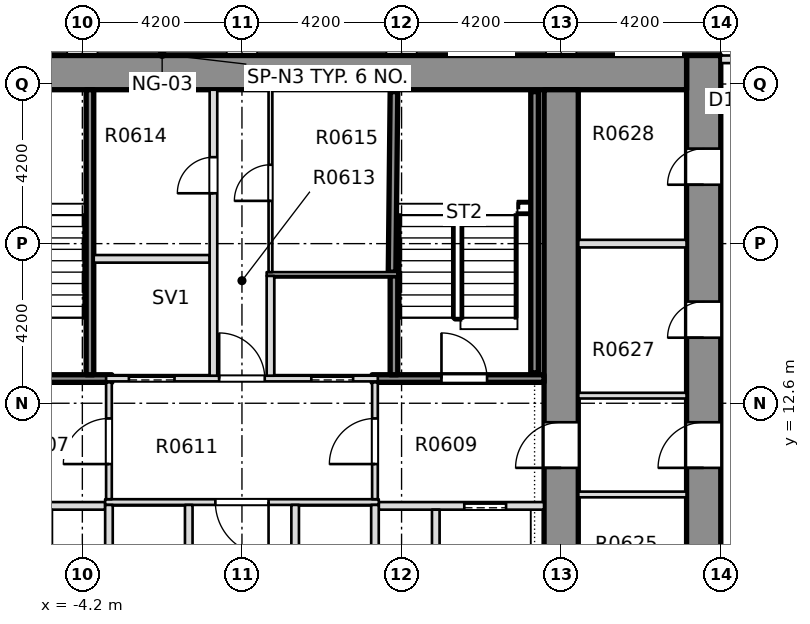
"""IFC4 building model, lengths in metres.
Left out: names, types, materials, properties, quantities, classifications, styles, units other than length and angle.
Written with IfcOpenShell. Run it as: python <this file> out.ifc"""

import sys

from ifc_helpers import new_model, si_unit, direction, frame, frame_2d, origin, place, context, subcontext, project, spatial, rectangle, extrude, element, fill, save


model = new_model("IFC4")
c1 = context("Model", 3, precision=1e-05, world=origin(), true_north=direction((0.0, 1.0)))
c2 = subcontext(c1, "Body", "Model", "MODEL_VIEW")
j1 = project(units=[si_unit("LENGTHUNIT", "METRE"), si_unit("PLANEANGLEUNIT", "RADIAN")], contexts=[c1])
p1 = place(None, origin())
s1 = spatial("IfcSite", under=j1, at=p1, CompositionType="ELEMENT")
p2 = place(p1, origin())
s2 = spatial("IfcBuilding", under=s1, at=p2, CompositionType="ELEMENT")
p3 = place(p2, frame((0.0, 0.0, 34.5)))
s3 = spatial("IfcBuildingStorey", under=s2, at=p3, CompositionType="ELEMENT", Elevation=34.5)
p4 = place(p3, frame((12.15, -8.4, -0.32), z_axis=(0.0, 0.0, 1.0), x_axis=(0.0, 1.0, 0.0)))
e1 = element("IfcWall", 1, at=p4, inside=s3, PredefinedType="SHEAR", context=c2, shape_type="SweptSolid", body=[
    extrude(rectangle(XDim=30.15, YDim=0.9, at=frame_2d((15.075, 0.0))), origin(), (0.0, 0.0, 1.0), 3.45),
])
p5 = place(p4, frame((3.425, 0.0, 0.32)))
e2 = element("IfcOpeningElement", 2, at=p5, cuts=e1, PredefinedType="OPENING", context=c2, shape_type="SweptSolid", body=[
    extrude(rectangle(XDim=0.95, YDim=2.1, at=frame_2d((0.475, 1.05))), frame((0.0, 0.46, 0.0), z_axis=(0.0, -1.0, 0.0), x_axis=(1.0, 0.0, 0.0)), (0.0, 0.0, 1.0), 0.92),
])
p6 = place(p4, frame((8.075, 0.0, 0.32)))
e3 = element("IfcOpeningElement", 3, at=p6, cuts=e1, PredefinedType="OPENING", context=c2, shape_type="SweptSolid", body=[
    extrude(rectangle(XDim=0.95, YDim=2.1, at=frame_2d((0.475, 1.05))), frame((0.0, 0.46, 0.0), z_axis=(0.0, -1.0, 0.0), x_axis=(1.0, 0.0, 0.0)), (0.0, 0.0, 1.0), 0.92),
])
p7 = place(p4, frame((11.425, 0.0, 0.32)))
e4 = element("IfcOpeningElement", 4, at=p7, cuts=e1, PredefinedType="OPENING", context=c2, shape_type="SweptSolid", body=[
    extrude(rectangle(XDim=0.95, YDim=2.1, at=frame_2d((0.475, 1.05))), frame((0.0, 0.46, 0.0), z_axis=(0.0, -1.0, 0.0), x_axis=(1.0, 0.0, 0.0)), (0.0, 0.0, 1.0), 0.92),
])
p8 = place(p4, frame((15.625, 0.0, 0.32)))
e5 = element("IfcOpeningElement", 5, at=p8, cuts=e1, PredefinedType="OPENING", context=c2, shape_type="SweptSolid", body=[
    extrude(rectangle(XDim=0.95, YDim=2.1, at=frame_2d((0.475, 1.05))), frame((0.0, 0.46, 0.0), z_axis=(0.0, -1.0, 0.0), x_axis=(1.0, 0.0, 0.0)), (0.0, 0.0, 1.0), 0.92),
])
p9 = place(p4, frame((22.725, 0.0, 0.32)))
e6 = element("IfcOpeningElement", 6, at=p9, cuts=e1, PredefinedType="OPENING", context=c2, shape_type="SweptSolid", body=[
    extrude(rectangle(XDim=0.95, YDim=2.1, at=frame_2d((0.475, 1.05))), frame((0.0, 0.46, 0.0), z_axis=(0.0, -1.0, 0.0), x_axis=(1.0, 0.0, 0.0)), (0.0, 0.0, 1.0), 0.92),
])
p10 = place(p4, frame((26.75, 0.0, 0.32)))
e7 = element("IfcOpeningElement", 7, at=p10, cuts=e1, PredefinedType="OPENING", context=c2, shape_type="SweptSolid", body=[
    extrude(rectangle(XDim=0.95, YDim=2.1, at=frame_2d((0.475, 1.05))), frame((0.0, 0.46, 0.0), z_axis=(0.0, -1.0, 0.0), x_axis=(1.0, 0.0, 0.0)), (0.0, 0.0, 1.0), 0.92),
])
p11 = place(p4, frame((19.3, 0.0, 0.32)))
e8 = element("IfcOpeningElement", 8, at=p11, cuts=e1, PredefinedType="OPENING", context=c2, shape_type="SweptSolid", body=[
    extrude(rectangle(XDim=1.2, YDim=2.1, at=frame_2d((0.6, 1.05))), frame((0.0, 0.46, 0.0), z_axis=(0.0, -1.0, 0.0), x_axis=(1.0, 0.0, 0.0)), (0.0, 0.0, 1.0), 0.92),
])
p12 = place(p3, frame((-11.7, 21.3, -0.32), z_axis=(0.0, 0.0, 1.0), x_axis=(1.0, 0.0, 0.0)))
e9 = element("IfcWall", 9, at=p12, inside=s3, PredefinedType="SOLIDWALL", context=c2, shape_type="SweptSolid", body=[
    extrude(rectangle(XDim=23.4, YDim=0.9, at=frame_2d((11.7, 0.0))), origin(), (0.0, 0.0, 1.0), 3.45),
])
p13 = place(p3, frame((8.4, -7.5, -0.32), z_axis=(0.0, 0.0, 1.0), x_axis=(0.0, 1.0, 0.0)))
e10 = element("IfcWall", 10, at=p13, inside=s3, PredefinedType="SHEAR", context=c2, shape_type="SweptSolid", body=[
    extrude(rectangle(XDim=28.35, YDim=0.9, at=frame_2d((14.175, 0.0))), origin(), (0.0, 0.0, 1.0), 3.45),
])
p14 = place(p13, frame((18.4, 0.0, 0.32)))
e11 = element("IfcOpeningElement", 11, at=p14, cuts=e10, PredefinedType="OPENING", context=c2, shape_type="SweptSolid", body=[
    extrude(rectangle(XDim=1.2, YDim=2.1, at=frame_2d((0.6, 1.05))), frame((0.0, 0.46, 0.0), z_axis=(0.0, -1.0, 0.0), x_axis=(1.0, 0.0, 0.0)), (0.0, 0.0, 1.0), 0.92),
])
p15 = place(p3, frame((16.1, 21.65, 0.0), z_axis=(0.0, 0.0, 1.0), x_axis=(-1.0, 0.0, 0.0)))
e12 = element("IfcWall", 12, at=p15, inside=s3, PredefinedType="STANDARD", context=c2, shape_type="SweptSolid", body=[
    extrude(rectangle(XDim=3.5, YDim=0.2, at=frame_2d((1.75, 0.0))), origin(), (0.0, 0.0, 1.0), 3.13),
])
p16 = place(p15, frame((2.2, 0.0, 0.0)))
e13 = element("IfcOpeningElement", 13, at=p16, cuts=e12, PredefinedType="OPENING", context=c2, shape_type="SweptSolid", body=[
    extrude(rectangle(XDim=1.0, YDim=2.4, at=frame_2d((0.5, 1.2))), frame((0.0, 0.11, 0.0), z_axis=(0.0, -1.0, 0.0), x_axis=(1.0, 0.0, 0.0)), (0.0, 0.0, 1.0), 0.22),
])
p17 = place(p3, frame((-7.949, 9.9, 0.0), z_axis=(0.0, 0.0, 1.0), x_axis=(1.0, 0.0, 0.0)))
e14 = element("IfcWall", 14, at=p17, inside=s3, PredefinedType="PARTITIONING", context=c2, shape_type="SweptSolid", body=[
    extrude(rectangle(XDim=4.349, YDim=0.2, at=frame_2d((2.174, 0.0))), origin(), (0.0, 0.0, 1.0), 3.13),
])
p18 = place(p17, frame((0.999, 0.0, 0.0)))
e15 = element("IfcOpeningElement", 15, at=p18, cuts=e14, PredefinedType="OPENING", context=c2, shape_type="SweptSolid", body=[
    extrude(rectangle(XDim=1.1, YDim=2.1, at=frame_2d((0.55, 1.05))), frame((0.0, 0.11, 0.0), z_axis=(0.0, -1.0, 0.0), x_axis=(1.0, 0.0, 0.0)), (0.0, 0.0, 1.0), 0.22),
])
p19 = place(p3, frame((3.6, 9.9, 0.0), z_axis=(0.0, 0.0, 1.0), x_axis=(1.0, 0.0, 0.0)))
e16 = element("IfcWall", 16, at=p19, inside=s3, PredefinedType="PARTITIONING", context=c2, shape_type="SweptSolid", body=[
    extrude(rectangle(XDim=4.349, YDim=0.2, at=frame_2d((2.174, 0.0))), origin(), (0.0, 0.0, 1.0), 3.13),
])
p20 = place(p19, frame((2.25, 0.0, 0.0)))
e17 = element("IfcOpeningElement", 17, at=p20, cuts=e16, PredefinedType="OPENING", context=c2, shape_type="SweptSolid", body=[
    extrude(rectangle(XDim=1.1, YDim=2.1, at=frame_2d((0.55, 1.05))), frame((0.0, 0.11, 0.0), z_axis=(0.0, -1.0, 0.0), x_axis=(1.0, 0.0, 0.0)), (0.0, 0.0, 1.0), 0.22),
])
p21 = place(p3, frame((-3.6, 10.0, 0.0), z_axis=(0.0, 0.0, 1.0), x_axis=(1.0, 0.0, 0.0)))
e18 = element("IfcWall", 18, at=p21, inside=s3, PredefinedType="PARTITIONING", context=c2, shape_type="SweptSolid", body=[
    extrude(rectangle(XDim=7.2, YDim=0.15, at=frame_2d((3.6, 0.0))), origin(), (0.0, 0.0, 1.0), 3.13),
])
p22 = place(p21, frame((2.9, 0.0, 0.0)))
e19 = element("IfcOpeningElement", 19, at=p22, cuts=e18, PredefinedType="OPENING", context=c2, shape_type="SweptSolid", body=[
    extrude(rectangle(XDim=1.4, YDim=2.1, at=frame_2d((0.7, 1.05))), frame((0.0, 0.085, 0.0), z_axis=(0.0, -1.0, 0.0), x_axis=(1.0, 0.0, 0.0)), (0.0, 0.0, 1.0), 0.17),
])
p23 = place(p3, frame((-7.949, 13.25, 0.0), z_axis=(0.0, 0.0, 1.0), x_axis=(1.0, 0.0, 0.0)))
e20 = element("IfcWall", 20, at=p23, inside=s3, PredefinedType="SOLIDWALL", context=c2, shape_type="SweptSolid", body=[
    extrude(rectangle(XDim=4.524, YDim=0.2, at=frame_2d((2.262, 0.0))), origin(), (0.0, 0.0, 1.0), 3.13),
])
p24 = place(p23, frame((1.499, 0.0, 0.0)))
e21 = element("IfcOpeningElement", 21, at=p24, cuts=e20, PredefinedType="OPENING", context=c2, shape_type="SweptSolid", body=[
    extrude(rectangle(XDim=1.2, YDim=2.1, at=frame_2d((0.6, 1.05))), frame((0.0, 0.11, 0.0), z_axis=(0.0, -1.0, 0.0), x_axis=(1.0, 0.0, 0.0)), (0.0, 0.0, 1.0), 0.22),
])
p25 = place(p3, frame((-3.575, 13.25, 0.0), z_axis=(0.0, 0.0, 1.0), x_axis=(1.0, 0.0, 0.0)))
e22 = element("IfcWall", 22, at=p25, inside=s3, PredefinedType="PARTITIONING", context=c2, shape_type="SweptSolid", body=[
    extrude(rectangle(XDim=7.15, YDim=0.15, at=frame_2d((3.575, 0.0))), origin(), (0.0, 0.0, 1.0), 3.13),
])
p26 = place(p25, frame((0.6, 0.0, 0.0)))
e23 = element("IfcOpeningElement", 23, at=p26, cuts=e22, PredefinedType="OPENING", context=c2, shape_type="SweptSolid", body=[
    extrude(rectangle(XDim=1.2, YDim=2.1, at=frame_2d((0.6, 1.05))), frame((0.0, 0.085, 0.0), z_axis=(0.0, -1.0, 0.0), x_axis=(1.0, 0.0, 0.0)), (0.0, 0.0, 1.0), 0.17),
])
p27 = place(p25, frame((5.4, 0.0, 0.0)))
e24 = element("IfcOpeningElement", 24, at=p27, cuts=e22, PredefinedType="OPENING", context=c2, shape_type="SweptSolid", body=[
    extrude(rectangle(XDim=1.1, YDim=2.1, at=frame_2d((0.55, 1.05))), frame((0.0, 0.085, 0.0), z_axis=(0.0, -1.0, 0.0), x_axis=(1.0, 0.0, 0.0)), (0.0, 0.0, 1.0), 0.17),
])
p28 = place(p25, frame((2.975, 0.0, 0.0)))
e25 = element("IfcOpeningElement", 25, at=p28, cuts=e22, PredefinedType="OPENING", context=c2, shape_type="SweptSolid", body=[
    extrude(rectangle(XDim=1.2, YDim=2.1, at=frame_2d((0.6, 1.05))), frame((0.0, 0.085, 0.0), z_axis=(0.0, -1.0, 0.0), x_axis=(1.0, 0.0, 0.0)), (0.0, 0.0, 1.0), 0.17),
])
p29 = place(p3, frame((3.425, 13.25, 0.0), z_axis=(0.0, 0.0, 1.0), x_axis=(1.0, 0.0, 0.0)))
e26 = element("IfcWall", 26, at=p29, inside=s3, PredefinedType="SOLIDWALL", context=c2, shape_type="SweptSolid", body=[
    extrude(rectangle(XDim=4.524, YDim=0.2, at=frame_2d((2.262, 0.0))), origin(), (0.0, 0.0, 1.0), 3.13),
])
p30 = place(p29, frame((1.825, 0.0, 0.0)))
e27 = element("IfcOpeningElement", 27, at=p30, cuts=e26, PredefinedType="OPENING", context=c2, shape_type="SweptSolid", body=[
    extrude(rectangle(XDim=1.2, YDim=2.1, at=frame_2d((0.6, 1.05))), frame((0.0, 0.11, 0.0), z_axis=(0.0, -1.0, 0.0), x_axis=(1.0, 0.0, 0.0)), (0.0, 0.0, 1.0), 0.22),
])
p31 = place(p3, frame((0.65, 16.0, 0.0), z_axis=(0.0, 0.0, 1.0), x_axis=(1.0, 0.0, 0.0)))
e28 = element("IfcWall", 28, at=p31, inside=s3, PredefinedType="PARTITIONING", context=c2, shape_type="SweptSolid", body=[
    extrude(rectangle(XDim=3.45, YDim=0.1, at=frame_2d((1.725, 0.0))), origin(), (0.0, 0.0, 1.0), 3.13),
])
p32 = place(p3, frame((-3.9, 16.4, 0.0), z_axis=(0.0, 0.0, 1.0), x_axis=(1.0, 0.0, 0.0)))
e29 = element("IfcWall", 29, at=p32, inside=s3, PredefinedType="PARTITIONING", context=c2, shape_type="SweptSolid", body=[
    extrude(rectangle(XDim=3.05, YDim=0.2, at=frame_2d((1.525, 0.0))), origin(), (0.0, 0.0, 1.0), 3.13),
])
p33 = place(p3, frame((-4.0, 13.35, 0.0), z_axis=(0.0, 0.0, 1.0), x_axis=(0.0, 1.0, 0.0)))
e30 = element("IfcWall", 30, at=p33, inside=s3, PredefinedType="SOLIDWALL", context=c2, shape_type="SweptSolid", body=[
    extrude(rectangle(XDim=7.499, YDim=0.2, at=frame_2d((3.75, 0.0))), origin(), (0.0, 0.0, 1.0), 3.13),
])
p34 = place(p3, frame((-3.5, 7.075, 0.0), z_axis=(0.0, 0.0, 1.0), x_axis=(0.0, 1.0, 0.0)))
e31 = element("IfcWall", 31, at=p34, inside=s3, PredefinedType="PARTITIONING", context=c2, shape_type="SweptSolid", body=[
    extrude(rectangle(XDim=2.85, YDim=0.2, at=frame_2d((1.425, 0.0))), origin(), (0.0, 0.0, 1.0), 3.13),
])
p35 = place(p3, frame((-3.5, 10.075, 0.0), z_axis=(0.0, 0.0, 1.0), x_axis=(0.0, 1.0, 0.0)))
e32 = element("IfcWall", 32, at=p35, inside=s3, PredefinedType="PARTITIONING", context=c2, shape_type="SweptSolid", body=[
    extrude(rectangle(XDim=3.075, YDim=0.15, at=frame_2d((1.538, 0.0))), origin(), (0.0, 0.0, 1.0), 3.13),
])
p36 = place(p35, frame((0.925, 0.0, 0.0)))
e33 = element("IfcOpeningElement", 33, at=p36, cuts=e32, PredefinedType="OPENING", context=c2, shape_type="SweptSolid", body=[
    extrude(rectangle(XDim=1.2, YDim=2.1, at=frame_2d((0.6, 1.05))), frame((0.0, 0.085, 0.0), z_axis=(0.0, -1.0, 0.0), x_axis=(1.0, 0.0, 0.0)), (0.0, 0.0, 1.0), 0.17),
])
p37 = place(p3, frame((-1.4, 7.075, 0.0), z_axis=(0.0, 0.0, 1.0), x_axis=(0.0, 1.0, 0.0)))
e34 = element("IfcWall", 34, at=p37, inside=s3, PredefinedType="PARTITIONING", context=c2, shape_type="SweptSolid", body=[
    extrude(rectangle(XDim=2.85, YDim=0.2, at=frame_2d((1.425, 0.0))), origin(), (0.0, 0.0, 1.0), 3.13),
])
p38 = place(p3, frame((-0.75, 13.325, 0.0), z_axis=(0.0, 0.0, 1.0), x_axis=(0.0, 1.0, 0.0)))
e35 = element("IfcWall", 35, at=p38, inside=s3, PredefinedType="PARTITIONING", context=c2, shape_type="SweptSolid", body=[
    extrude(rectangle(XDim=7.524, YDim=0.2, at=frame_2d((3.762, 0.0))), origin(), (0.0, 0.0, 1.0), 3.13),
])
p39 = place(p38, frame((4.8, 0.0, 0.0)))
e36 = element("IfcOpeningElement", 36, at=p39, cuts=e35, PredefinedType="OPENING", context=c2, shape_type="SweptSolid", body=[
    extrude(rectangle(XDim=0.95, YDim=2.1, at=frame_2d((0.475, 1.05))), frame((0.0, 0.11, 0.0), z_axis=(0.0, -1.0, 0.0), x_axis=(1.0, 0.0, 0.0)), (0.0, 0.0, 1.0), 0.22),
])
p40 = place(p3, frame((0.75, 13.325, 0.0), z_axis=(0.0, 0.0, 1.0), x_axis=(0.0, 1.0, 0.0)))
e37 = element("IfcWall", 37, at=p40, inside=s3, PredefinedType="PARTITIONING", context=c2, shape_type="SweptSolid", body=[
    extrude(rectangle(XDim=2.625, YDim=0.2, at=frame_2d((1.312, 0.0))), origin(), (0.0, 0.0, 1.0), 3.13),
])
p41 = place(p3, frame((0.75, 16.05, 0.0), z_axis=(0.0, 0.0, 1.0), x_axis=(0.0, 1.0, 0.0)))
e38 = element("IfcWall", 38, at=p41, inside=s3, PredefinedType="PARTITIONING", context=c2, shape_type="SweptSolid", body=[
    extrude(rectangle(XDim=4.799, YDim=0.1, at=frame_2d((2.399, 0.0))), origin(), (0.0, 0.0, 1.0), 3.13),
])
p42 = place(p41, frame((1.875, 0.0, 0.0)))
e39 = element("IfcOpeningElement", 39, at=p42, cuts=e38, PredefinedType="OPENING", context=c2, shape_type="SweptSolid", body=[
    extrude(rectangle(XDim=0.95, YDim=2.1, at=frame_2d((0.475, 1.05))), frame((0.0, 0.06, 0.0), z_axis=(0.0, -1.0, 0.0), x_axis=(1.0, 0.0, 0.0)), (0.0, 0.0, 1.0), 0.12),
])
for number, where, z_axis, x_axis in (
    (40, (1.4, 7.075, 0.0), (0.0, 0.0, 1.0), (0.0, 1.0, 0.0)),
    (41, (3.5, 7.075, 0.0), (0.0, 0.0, 1.0), (0.0, 1.0, 0.0)),
):
    element("IfcWall", number, at=place(p3, frame(where, z_axis=z_axis, x_axis=x_axis)), inside=s3, PredefinedType="PARTITIONING", context=c2, shape_type="SweptSolid", body=[
        extrude(rectangle(XDim=2.85, YDim=0.2, at=frame_2d((1.425, 0.0))), origin(), (0.0, 0.0, 1.0), 3.13),
    ])
p43 = place(p3, frame((3.5, 10.075, 0.0), z_axis=(0.0, 0.0, 1.0), x_axis=(0.0, 1.0, 0.0)))
e42 = element("IfcWall", 42, at=p43, inside=s3, PredefinedType="PARTITIONING", context=c2, shape_type="SweptSolid", body=[
    extrude(rectangle(XDim=3.075, YDim=0.15, at=frame_2d((1.538, 0.0))), origin(), (0.0, 0.0, 1.0), 3.13),
])
p44 = place(p43, frame((0.925, 0.0, 0.0)))
e43 = element("IfcOpeningElement", 43, at=p44, cuts=e42, PredefinedType="OPENING", context=c2, shape_type="SweptSolid", body=[
    extrude(rectangle(XDim=1.2, YDim=2.1, at=frame_2d((0.6, 1.05))), frame((0.0, 0.085, 0.0), z_axis=(0.0, -1.0, 0.0), x_axis=(1.0, 0.0, 0.0)), (0.0, 0.0, 1.0), 0.17),
])
p45 = place(p3, frame((4.0, 13.35, 0.0), z_axis=(0.0, 0.0, 1.0), x_axis=(0.0, 1.0, 0.0)))
e44 = element("IfcWall", 44, at=p45, inside=s3, PredefinedType="SOLIDWALL", context=c2, shape_type="SweptSolid", body=[
    extrude(rectangle(XDim=2.6, YDim=0.2, at=frame_2d((1.3, 0.0))), origin(), (0.0, 0.0, 1.0), 3.13),
])
p46 = place(p3, frame((3.95, 16.05, 0.0), z_axis=(0.0, 0.0, 1.0), x_axis=(0.010538176883, 0.999944471872, 0.0)))
e45 = element("IfcWall", 45, at=p46, inside=s3, PredefinedType="SOLIDWALL", context=c2, shape_type="SweptSolid", body=[
    extrude(rectangle(XDim=4.749, YDim=0.2, at=frame_2d((2.375, 0.0))), origin(), (0.0, 0.0, 1.0), 3.13),
])
p47 = place(p3, frame((5.1, 7.075, 0.0), z_axis=(0.0, 0.0, 1.0), x_axis=(0.0, 1.0, 0.0)))
e46 = element("IfcWall", 46, at=p47, inside=s3, PredefinedType="PARTITIONING", context=c2, shape_type="SweptSolid", body=[
    extrude(rectangle(XDim=2.725, YDim=0.2, at=frame_2d((1.363, 0.0))), origin(), (0.0, 0.0, 1.0), 3.13),
])
for number, where, z_axis, x_axis in (
    (47, (8.851, 10.2, 0.0), (0.0, 0.0, 1.0), (1.0, 0.0, 0.0)),
    (48, (8.851, 12.8, 0.0), (0.0, 0.0, 1.0), (1.0, 0.0, 0.0)),
):
    element("IfcWall", number, at=place(p3, frame(where, z_axis=z_axis, x_axis=x_axis)), inside=s3, PredefinedType="PARTITIONING", context=c2, shape_type="SweptSolid", body=[
        extrude(rectangle(XDim=2.848, YDim=0.15, at=frame_2d((1.424, 0.0))), origin(), (0.0, 0.0, 1.0), 3.13),
    ])
p48 = place(p3, frame((8.851, 16.8, 0.0), z_axis=(0.0, 0.0, 1.0), x_axis=(1.0, 0.0, 0.0)))
e49 = element("IfcWall", 49, at=p48, inside=s3, PredefinedType="PARTITIONING", context=c2, shape_type="SweptSolid", body=[
    extrude(rectangle(XDim=2.848, YDim=0.2, at=frame_2d((1.424, 0.0))), origin(), (0.0, 0.0, 1.0), 3.13),
])
p49 = place(p3, frame((7.7, 13.4, 0.0), z_axis=(0.0, 0.0, 1.0), x_axis=(0.0, 1.0, 0.0)))
e50 = element("IfcWall", 50, at=p49, inside=s3, PredefinedType="SOLIDWALL", context=c2, shape_type="SweptSolid", body=[
    extrude(rectangle(XDim=7.4, YDim=0.2, at=frame_2d((3.7, 0.0))), origin(), (0.0, 0.0, 1.0), 3.13),
])
p50 = place(p30, origin())
e51 = element("IfcDoor", 51, at=p50, inside=s3, OperationType="SINGLE_SWING_RIGHT", PredefinedType="DOOR", context=c2, shape_type="SweptSolid", body=[
    extrude(rectangle(XDim=1.2, YDim=2.1, at=frame_2d((0.6, 1.05))), frame((0.0, 0.025, 0.0), z_axis=(0.0, -1.0, 0.0), x_axis=(1.0, 0.0, 0.0)), (0.0, 0.0, 1.0), 0.05),
])
fill(e27, e51)
p51 = place(p20, origin())
e52 = element("IfcDoor", 52, at=p51, inside=s3, OperationType="SLIDING_TO_LEFT", PredefinedType="DOOR", context=c2, shape_type="SweptSolid", body=[
    extrude(rectangle(XDim=1.1, YDim=2.1, at=frame_2d((0.55, 1.05))), frame((0.0, 0.025, 0.0), z_axis=(0.0, -1.0, 0.0), x_axis=(1.0, 0.0, 0.0)), (0.0, 0.0, 1.0), 0.05),
])
fill(e17, e52)
p52 = place(p22, origin())
e53 = element("IfcDoor", 53, at=p52, inside=s3, OperationType="SINGLE_SWING_RIGHT", PredefinedType="DOOR", context=c2, shape_type="SweptSolid", body=[
    extrude(rectangle(XDim=1.4, YDim=2.1, at=frame_2d((0.7, 1.05))), frame((0.0, 0.025, 0.0), z_axis=(0.0, -1.0, 0.0), x_axis=(1.0, 0.0, 0.0)), (0.0, 0.0, 1.0), 0.05),
])
fill(e19, e53)
p53 = place(p26, origin())
e54 = element("IfcDoor", 54, at=p53, inside=s3, OperationType="SLIDING_TO_RIGHT", PredefinedType="DOOR", context=c2, shape_type="SweptSolid", body=[
    extrude(rectangle(XDim=1.2, YDim=2.1, at=frame_2d((0.6, 1.05))), frame((0.0, 0.025, 0.0), z_axis=(0.0, -1.0, 0.0), x_axis=(1.0, 0.0, 0.0)), (0.0, 0.0, 1.0), 0.05),
])
fill(e23, e54)
p54 = place(p27, origin())
e55 = element("IfcDoor", 55, at=p54, inside=s3, OperationType="SLIDING_TO_LEFT", PredefinedType="DOOR", context=c2, shape_type="SweptSolid", body=[
    extrude(rectangle(XDim=1.1, YDim=2.1, at=frame_2d((0.55, 1.05))), frame((0.0, 0.025, 0.0), z_axis=(0.0, -1.0, 0.0), x_axis=(1.0, 0.0, 0.0)), (0.0, 0.0, 1.0), 0.05),
])
fill(e24, e55)
p55 = place(p28, origin())
e56 = element("IfcDoor", 56, at=p55, inside=s3, OperationType="SINGLE_SWING_RIGHT", PredefinedType="DOOR", context=c2, shape_type="SweptSolid", body=[
    extrude(rectangle(XDim=1.2, YDim=2.1, at=frame_2d((0.6, 1.05))), frame((0.0, 0.025, 0.0), z_axis=(0.0, -1.0, 0.0), x_axis=(1.0, 0.0, 0.0)), (0.0, 0.0, 1.0), 0.05),
])
fill(e25, e56)
p56 = place(p39, origin())
e57 = element("IfcDoor", 57, at=p56, inside=s3, OperationType="SINGLE_SWING_RIGHT", PredefinedType="DOOR", context=c2, shape_type="SweptSolid", body=[
    extrude(rectangle(XDim=0.95, YDim=2.1, at=frame_2d((0.475, 1.05))), frame((0.0, 0.025, 0.0), z_axis=(0.0, -1.0, 0.0), x_axis=(1.0, 0.0, 0.0)), (0.0, 0.0, 1.0), 0.05),
])
fill(e36, e57)
p57 = place(p42, origin())
e58 = element("IfcDoor", 58, at=p57, inside=s3, OperationType="SINGLE_SWING_LEFT", PredefinedType="DOOR", context=c2, shape_type="SweptSolid", body=[
    extrude(rectangle(XDim=0.95, YDim=2.1, at=frame_2d((0.475, 1.05))), frame((0.0, 0.025, 0.0), z_axis=(0.0, -1.0, 0.0), x_axis=(1.0, 0.0, 0.0)), (0.0, 0.0, 1.0), 0.05),
])
fill(e39, e58)
p58 = place(p36, origin())
e59 = element("IfcDoor", 59, at=p58, inside=s3, OperationType="SINGLE_SWING_RIGHT", PredefinedType="DOOR", context=c2, shape_type="SweptSolid", body=[
    extrude(rectangle(XDim=1.2, YDim=2.1, at=frame_2d((0.6, 1.05))), frame((0.0, 0.025, 0.0), z_axis=(0.0, -1.0, 0.0), x_axis=(1.0, 0.0, 0.0)), (0.0, 0.0, 1.0), 0.05),
])
fill(e33, e59)
p59 = place(p44, origin())
e60 = element("IfcDoor", 60, at=p59, inside=s3, OperationType="SINGLE_SWING_LEFT", PredefinedType="DOOR", context=c2, shape_type="SweptSolid", body=[
    extrude(rectangle(XDim=1.2, YDim=2.1, at=frame_2d((0.6, 1.05))), frame((0.0, 0.025, 0.0), z_axis=(0.0, -1.0, 0.0), x_axis=(1.0, 0.0, 0.0)), (0.0, 0.0, 1.0), 0.05),
])
fill(e43, e60)
p60 = place(p9, origin())
e61 = element("IfcDoor", 61, at=p60, inside=s3, OperationType="SINGLE_SWING_LEFT", PredefinedType="DOOR", context=c2, shape_type="SweptSolid", body=[
    extrude(rectangle(XDim=0.95, YDim=2.1, at=frame_2d((0.475, 1.05))), frame((0.0, 0.025, 0.0), z_axis=(0.0, -1.0, 0.0), x_axis=(1.0, 0.0, 0.0)), (0.0, 0.0, 1.0), 0.05),
])
fill(e6, e61)
p61 = place(p10, origin())
e62 = element("IfcDoor", 62, at=p61, inside=s3, OperationType="SINGLE_SWING_LEFT", PredefinedType="DOOR", context=c2, shape_type="SweptSolid", body=[
    extrude(rectangle(XDim=0.95, YDim=2.1, at=frame_2d((0.475, 1.05))), frame((0.0, 0.025, 0.0), z_axis=(0.0, -1.0, 0.0), x_axis=(1.0, 0.0, 0.0)), (0.0, 0.0, 1.0), 0.05),
])
fill(e7, e62)
p62 = place(p11, origin())
e63 = element("IfcDoor", 63, at=p62, inside=s3, OperationType="SINGLE_SWING_LEFT", PredefinedType="DOOR", context=c2, shape_type="SweptSolid", body=[
    extrude(rectangle(XDim=1.2, YDim=2.1, at=frame_2d((0.6, 1.05))), frame((0.0, 0.025, 0.0), z_axis=(0.0, -1.0, 0.0), x_axis=(1.0, 0.0, 0.0)), (0.0, 0.0, 1.0), 0.05),
])
fill(e8, e63)
p63 = place(p14, origin())
e64 = element("IfcDoor", 64, at=p63, inside=s3, OperationType="SINGLE_SWING_LEFT", PredefinedType="DOOR", context=c2, shape_type="SweptSolid", body=[
    extrude(rectangle(XDim=1.2, YDim=2.1, at=frame_2d((0.6, 1.05))), frame((0.0, 0.025, 0.0), z_axis=(0.0, -1.0, 0.0), x_axis=(1.0, 0.0, 0.0)), (0.0, 0.0, 1.0), 0.05),
])
fill(e11, e64)
save(model, sys.argv[1])
